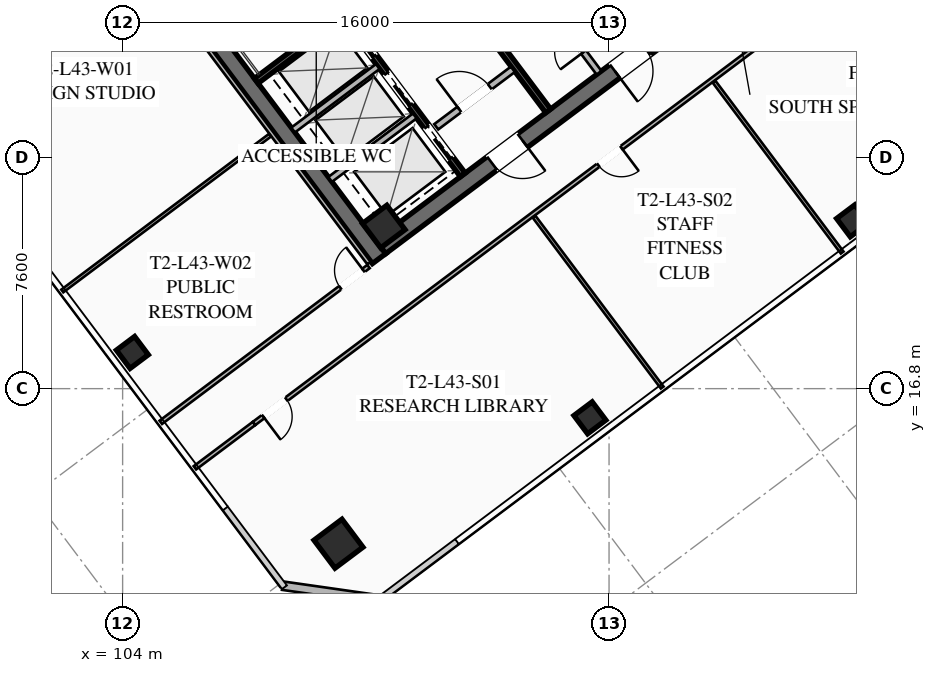
"""IFC4 building model, lengths in metres.
Left out: names, types, materials, properties, quantities, classifications, styles, units other than length and angle.
Written with IfcOpenShell. Run it as: python <this file> out.ifc"""

import sys

from ifc_helpers import new_model, si_unit, direction, frame, frame_2d, origin, origin_2d, place, context, subcontext, project, spatial, rectangle, hollow_rectangle, extrude, element, fill, save


model = new_model("IFC4")
c1 = context("Model", 3, precision=1e-05, world=origin(), true_north=direction((0.0, 1.0)))
c2 = subcontext(c1, "Body", "Model", "MODEL_VIEW")
j1 = project(units=[si_unit("LENGTHUNIT", "METRE"), si_unit("PLANEANGLEUNIT", "RADIAN")], contexts=[c1])
p1 = place(None, origin())
s1 = spatial("IfcSite", under=j1, at=p1, CompositionType="ELEMENT")
p2 = place(p1, origin())
s2 = spatial("IfcBuilding", under=s1, at=p2, CompositionType="ELEMENT")
p3 = place(p2, frame((0.0, 0.0, 160.55)))
s3 = spatial("IfcBuildingStorey", under=s2, at=p3, CompositionType="ELEMENT", Elevation=160.55)
p4 = place(p3, frame((112.436, 21.077, 0.0), z_axis=(0.0, 0.0, 1.0), x_axis=(-0.600005007985, 0.799996243986, 0.0)))
e1 = element("IfcWall", 1, at=p4, inside=s3, PredefinedType="SHEAR", context=c2, shape_type="SweptSolid", body=[
    extrude(rectangle(XDim=15.6, YDim=0.55, at=frame_2d((7.8, 0.0))), origin(), (0.0, 0.0, 1.0), 3.55),
])
p5 = place(p3, frame((124.539, 30.498, 0.0), z_axis=(0.0, 0.0, 1.0), x_axis=(-0.799998054672, -0.600002593761, 0.0)))
e2 = element("IfcWall", 2, at=p5, inside=s3, PredefinedType="SHEAR", context=c2, shape_type="SweptSolid", body=[
    extrude(rectangle(XDim=15.06, YDim=0.55, at=frame_2d((7.53, 0.0))), origin(), (0.0, 0.0, 1.0), 3.55),
])
p6 = place(p5, frame((9.23, 0.0, 0.0)))
e3 = element("IfcOpeningElement", 3, at=p6, cuts=e2, PredefinedType="OPENING", context=c2, shape_type="SweptSolid", body=[
    extrude(rectangle(XDim=1.25, YDim=2.25, at=frame_2d((0.625, 1.125))), frame((0.0, 0.285, 0.0), z_axis=(0.0, -1.0, 0.0), x_axis=(1.0, 0.0, 0.0)), (0.0, 0.0, 1.0), 0.57),
])
p7 = place(p5, frame((4.18, 0.0, 0.0)))
e4 = element("IfcOpeningElement", 4, at=p7, cuts=e2, PredefinedType="OPENING", context=c2, shape_type="SweptSolid", body=[
    extrude(rectangle(XDim=1.25, YDim=2.25, at=frame_2d((0.625, 1.125))), frame((0.0, 0.285, 0.0), z_axis=(0.0, -1.0, 0.0), x_axis=(1.0, 0.0, 0.0)), (0.0, 0.0, 1.0), 0.57),
])
p8 = place(p3, frame((112.59, 22.13, 0.0), z_axis=(0.0, 0.0, 1.0), x_axis=(0.799999996291, 0.600000004945, 0.0)))
e5 = element("IfcColumn", 5, at=p8, inside=s3, PredefinedType="COLUMN", context=c2, shape_type="SweptSolid", body=[
    extrude(hollow_rectangle(XDim=1.0, YDim=1.0, WallThickness=0.04, at=origin_2d()), origin(), (0.0, 0.0, 1.0), 3.37),
])
p9 = place(p3, frame((111.1, 11.7, 0.0), z_axis=(0.0, 0.0, 1.0), x_axis=(0.799999996291, 0.600000004945, 0.0)))
e6 = element("IfcColumn", 6, at=p9, inside=s3, PredefinedType="COLUMN", context=c2, shape_type="SweptSolid", body=[
    extrude(hollow_rectangle(XDim=1.15, YDim=1.15, WallThickness=0.045, at=origin_2d()), origin(), (0.0, 0.0, 1.0), 3.37),
])
for number, where, z_axis, x_axis in (
    (7, (119.37, 15.84, 0.0), (0.0, 0.0, 1.0), (0.8, 0.6, 0.0)),
    (8, (128.01, 22.32, 0.0), (0.0, 0.0, 1.0), (0.8, 0.6, 0.0)),
    (9, (104.32, 17.99, 0.0), (0.0, 0.0, 1.0), (0.8, 0.6, 0.0)),
):
    element("IfcColumn", number, at=place(p3, frame(where, z_axis=z_axis, x_axis=x_axis)), inside=s3, PredefinedType="COLUMN", context=c2, shape_type="SweptSolid", body=[
        extrude(hollow_rectangle(XDim=0.75, YDim=0.75, WallThickness=0.032, at=origin_2d()), origin(), (0.0, 0.0, 1.0), 3.37),
    ])
p10 = place(p3, frame((112.48, 9.86, 0.0), z_axis=(0.0, 0.0, 1.0), x_axis=(-0.989950994782, 0.141410847992, 0.0)))
e10 = element("IfcWall", 10, at=p10, inside=s3, PredefinedType="SOLIDWALL", context=c2, shape_type="SweptSolid", body=[
    extrude(rectangle(XDim=3.253, YDim=0.28, at=frame_2d((1.626, 0.0))), origin(), (0.0, 0.0, 1.0), 3.37),
])
p11 = place(p3, frame((108.396, 26.922, 0.0), z_axis=(0.0, 0.0, 1.0), x_axis=(0.800015298837, 0.599979601008, 0.0)))
e11 = element("IfcWall", 11, at=p11, inside=s3, PredefinedType="SHEAR", context=c2, shape_type="SweptSolid", body=[
    extrude(rectangle(XDim=3.83, YDim=0.2, at=frame_2d((1.915, 0.0))), origin(), (0.0, 0.0, 1.0), 3.37),
])
p12 = place(p3, frame((117.998, 25.936, 0.0), z_axis=(0.0, 0.0, 1.0), x_axis=(-0.600002693989, 0.799997979501, 0.0)))
e12 = element("IfcWall", 12, at=p12, inside=s3, PredefinedType="SHEAR", context=c2, shape_type="SweptSolid", body=[
    extrude(rectangle(XDim=14.5, YDim=0.2, at=frame_2d((7.25, 0.0))), origin(), (0.0, 0.0, 1.0), 3.37),
])
p13 = place(p3, frame((114.316, 25.412, 0.0), z_axis=(0.0, 0.0, 1.0), x_axis=(0.800018601094, 0.59997519774, 0.0)))
e13 = element("IfcWall", 13, at=p13, inside=s3, PredefinedType="SOLIDWALL", context=c2, shape_type="SweptSolid", body=[
    extrude(rectangle(XDim=3.15, YDim=0.22, at=frame_2d((1.575, 0.0))), origin(), (0.0, 0.0, 1.0), 2.723),
])
p14 = place(p13, frame((0.95, 0.0, 0.0)))
e14 = element("IfcOpeningElement", 14, at=p14, cuts=e13, PredefinedType="OPENING", context=c2, shape_type="SweptSolid", body=[
    extrude(rectangle(XDim=1.25, YDim=2.25, at=frame_2d((0.625, 1.125))), frame((0.0, 0.12, 0.0), z_axis=(0.0, -1.0, 0.0), x_axis=(1.0, 0.0, 0.0)), (0.0, 0.0, 1.0), 0.24),
])
p15 = place(p3, frame((115.19, 23.83, 0.0), z_axis=(0.0, 0.0, 1.0), x_axis=(-0.599993943644, 0.800004542231, 0.0)))
e15 = element("IfcWall", 15, at=p15, inside=s3, PredefinedType="SHEAR", context=c2, shape_type="SweptSolid", body=[
    extrude(rectangle(XDim=6.45, YDim=0.2, at=frame_2d((3.225, 0.0))), origin(), (0.0, 0.0, 1.0), 3.37),
])
p16 = place(p15, frame((4.875, 0.0, 0.0)))
e16 = element("IfcOpeningElement", 16, at=p16, cuts=e15, PredefinedType="OPENING", context=c2, shape_type="SweptSolid", body=[
    extrude(rectangle(XDim=1.3, YDim=2.25, at=frame_2d((0.65, 1.125))), frame((0.0, 0.11, 0.0), z_axis=(0.0, -1.0, 0.0), x_axis=(1.0, 0.0, 0.0)), (0.0, 0.0, 1.0), 0.22),
])
p17 = place(p15, frame((2.875, 0.0, 0.0)))
e17 = element("IfcOpeningElement", 17, at=p17, cuts=e15, PredefinedType="OPENING", context=c2, shape_type="SweptSolid", body=[
    extrude(rectangle(XDim=1.3, YDim=2.25, at=frame_2d((0.65, 1.125))), frame((0.0, 0.11, 0.0), z_axis=(0.0, -1.0, 0.0), x_axis=(1.0, 0.0, 0.0)), (0.0, 0.0, 1.0), 0.22),
])
p18 = place(p15, frame((0.675, 0.0, 0.0)))
e18 = element("IfcOpeningElement", 18, at=p18, cuts=e15, PredefinedType="OPENING", context=c2, shape_type="SweptSolid", body=[
    extrude(rectangle(XDim=1.3, YDim=2.25, at=frame_2d((0.65, 1.125))), frame((0.0, 0.11, 0.0), z_axis=(0.0, -1.0, 0.0), x_axis=(1.0, 0.0, 0.0)), (0.0, 0.0, 1.0), 0.22),
])
for number, where, z_axis, x_axis in (
    (19, (110.826, 23.682, 0.0), (0.0, 0.0, 1.0), (0.8, 0.6, 0.0)),
    (20, (109.608, 25.306, 0.0), (0.0, 0.0, 1.0), (0.8, 0.6, 0.0)),
):
    element("IfcWall", number, at=place(p3, frame(where, z_axis=z_axis, x_axis=x_axis)), inside=s3, PredefinedType="SOLIDWALL", context=c2, shape_type="SweptSolid", body=[
        extrude(rectangle(XDim=3.48, YDim=0.2, at=frame_2d((1.74, 0.0))), origin(), (0.0, 0.0, 1.0), 3.37),
    ])
p19 = place(p3, frame((119.67, 27.19, 0.0), z_axis=(0.0, 0.0, 1.0), x_axis=(-0.599988677396, 0.800008491828, 0.0)))
e21 = element("IfcWall", 21, at=p19, inside=s3, PredefinedType="SOLIDWALL", context=c2, shape_type="SweptSolid", body=[
    extrude(rectangle(XDim=6.9, YDim=0.2, at=frame_2d((3.45, 0.0))), origin(), (0.0, 0.0, 1.0), 2.723),
])
p20 = place(p19, frame((0.85, 0.0, 0.0)))
e22 = element("IfcOpeningElement", 22, at=p20, cuts=e21, PredefinedType="OPENING", context=c2, shape_type="SweptSolid", body=[
    extrude(rectangle(XDim=0.95, YDim=2.05, at=frame_2d((0.475, 1.025))), frame((0.0, 0.11, 0.0), z_axis=(0.0, -1.0, 0.0), x_axis=(1.0, 0.0, 0.0)), (0.0, 0.0, 1.0), 0.22),
])
p21 = place(p19, frame((4.8, 0.0, 0.0)))
e23 = element("IfcOpeningElement", 23, at=p21, cuts=e21, PredefinedType="OPENING", context=c2, shape_type="SweptSolid", body=[
    extrude(rectangle(XDim=1.05, YDim=2.2, at=frame_2d((0.525, 1.1))), frame((0.0, 0.11, 0.0), z_axis=(0.0, -1.0, 0.0), x_axis=(1.0, 0.0, 0.0)), (0.0, 0.0, 1.0), 0.22),
])
p22 = place(p3, frame((131.282, 32.874, 0.0), z_axis=(0.0, 0.0, 1.0), x_axis=(-0.8, -0.6, 0.0)))
e24 = element("IfcWall", 24, at=p22, inside=s3, PredefinedType="PARTITIONING", context=c2, shape_type="SweptSolid", body=[
    extrude(rectangle(XDim=28.7, YDim=0.135, at=frame_2d((14.35, 0.0))), origin(), (0.0, 0.0, 1.0), 2.723),
])
p23 = place(p22, frame((27.37, 0.0, 0.0)))
e25 = element("IfcOpeningElement", 25, at=p23, cuts=e24, PredefinedType="OPENING", context=c2, shape_type="SweptSolid", body=[
    extrude(rectangle(XDim=0.95, YDim=2.05, at=frame_2d((0.475, 1.025))), frame((0.0, 0.077, 0.0), z_axis=(0.0, -1.0, 0.0), x_axis=(1.0, 0.0, 0.0)), (0.0, 0.0, 1.0), 0.155),
])
p24 = place(p22, frame((13.592, 0.0, 0.0)))
e26 = element("IfcOpeningElement", 26, at=p24, cuts=e24, PredefinedType="OPENING", context=c2, shape_type="SweptSolid", body=[
    extrude(rectangle(XDim=0.95, YDim=2.05, at=frame_2d((0.475, 1.025))), frame((0.0, 0.077, 0.0), z_axis=(0.0, -1.0, 0.0), x_axis=(1.0, 0.0, 0.0)), (0.0, 0.0, 1.0), 0.155),
])
p25 = place(p22, frame((0.38, 0.0, 0.0)))
e27 = element("IfcOpeningElement", 27, at=p25, cuts=e24, PredefinedType="OPENING", context=c2, shape_type="SweptSolid", body=[
    extrude(rectangle(XDim=0.95, YDim=2.05, at=frame_2d((0.475, 1.025))), frame((0.0, 0.077, 0.0), z_axis=(0.0, -1.0, 0.0), x_axis=(1.0, 0.0, 0.0)), (0.0, 0.0, 1.0), 0.155),
])
p26 = place(p3, frame((106.378, 14.196, 0.0), z_axis=(0.0, 0.0, 1.0), x_axis=(0.800012055778, 0.599983925293, 0.0)))
e28 = element("IfcWall", 28, at=p26, inside=s3, PredefinedType="PARTITIONING", context=c2, shape_type="SweptSolid", body=[
    extrude(rectangle(XDim=2.43, YDim=0.135, at=frame_2d((1.215, 0.0))), origin(), (0.0, 0.0, 1.0), 2.723),
])
for number, where, z_axis, x_axis in (
    (29, (121.748, 16.836, 0.0), (0.0, 0.0, 1.0), (-0.6, 0.8, 0.0)),
    (30, (127.668, 21.276, 0.0), (0.0, 0.0, 1.0), (-0.6, 0.8, 0.0)),
):
    element("IfcWall", number, at=place(p3, frame(where, z_axis=z_axis, x_axis=x_axis)), inside=s3, PredefinedType="PARTITIONING", context=c2, shape_type="SweptSolid", body=[
        extrude(rectangle(XDim=7.03, YDim=0.11, at=frame_2d((3.515, 0.0))), origin(), (0.0, 0.0, 1.0), 2.723),
    ])
p27 = place(p3, frame((112.104, 20.928, 0.0), z_axis=(0.0, 0.0, 1.0), x_axis=(-0.599994940075, 0.800003794918, 0.0)))
e31 = element("IfcWall", 31, at=p27, inside=s3, PredefinedType="PARTITIONING", context=c2, shape_type="SweptSolid", body=[
    extrude(rectangle(XDim=15.44, YDim=0.135, at=frame_2d((7.72, 0.0))), origin(), (0.0, 0.0, 1.0), 2.723),
])
p28 = place(p3, frame((105.256, 15.692, 0.0), z_axis=(0.0, 0.0, 1.0), x_axis=(0.799989708052, 0.600013722352, 0.0)))
e32 = element("IfcWall", 32, at=p28, inside=s3, PredefinedType="PARTITIONING", context=c2, shape_type="SweptSolid", body=[
    extrude(rectangle(XDim=8.54, YDim=0.135, at=frame_2d((4.27, 0.0))), origin(), (0.0, 0.0, 1.0), 2.723),
])
p29 = place(p28, frame((7.38, 0.0, 0.0)))
e33 = element("IfcOpeningElement", 33, at=p29, cuts=e32, PredefinedType="OPENING", context=c2, shape_type="SweptSolid", body=[
    extrude(rectangle(XDim=0.95, YDim=2.05, at=frame_2d((0.475, 1.025))), frame((0.0, 0.077, 0.0), z_axis=(0.0, -1.0, 0.0), x_axis=(1.0, 0.0, 0.0)), (0.0, 0.0, 1.0), 0.155),
])
p30 = place(p3, frame((102.016, 20.012, 0.0), z_axis=(0.0, 0.0, 1.0), x_axis=(0.799989708052, 0.600013722352, 0.0)))
e34 = element("IfcWall", 34, at=p30, inside=s3, PredefinedType="PARTITIONING", context=c2, shape_type="SweptSolid", body=[
    extrude(rectangle(XDim=8.54, YDim=0.11, at=frame_2d((4.27, 0.0))), origin(), (0.0, 0.0, 1.0), 2.723),
])
p31 = place(p6, origin())
e35 = element("IfcDoor", 35, at=p31, inside=s3, OperationType="SINGLE_SWING_LEFT", PredefinedType="DOOR", context=c2, shape_type="SweptSolid", body=[
    extrude(rectangle(XDim=1.25, YDim=2.25, at=frame_2d((0.625, 1.125))), frame((0.0, 0.025, 0.0), z_axis=(0.0, -1.0, 0.0), x_axis=(1.0, 0.0, 0.0)), (0.0, 0.0, 1.0), 0.05),
])
fill(e3, e35)
p32 = place(p7, origin())
e36 = element("IfcDoor", 36, at=p32, inside=s3, OperationType="SINGLE_SWING_RIGHT", PredefinedType="DOOR", context=c2, shape_type="SweptSolid", body=[
    extrude(rectangle(XDim=1.25, YDim=2.25, at=frame_2d((0.625, 1.125))), frame((0.0, 0.025, 0.0), z_axis=(0.0, -1.0, 0.0), x_axis=(1.0, 0.0, 0.0)), (0.0, 0.0, 1.0), 0.05),
])
fill(e4, e36)
p33 = place(p14, origin())
e37 = element("IfcDoor", 37, at=p33, inside=s3, OperationType="SINGLE_SWING_LEFT", PredefinedType="DOOR", context=c2, shape_type="SweptSolid", body=[
    extrude(rectangle(XDim=1.25, YDim=2.25, at=frame_2d((0.625, 1.125))), frame((0.0, 0.025, 0.0), z_axis=(0.0, -1.0, 0.0), x_axis=(1.0, 0.0, 0.0)), (0.0, 0.0, 1.0), 0.05),
])
fill(e14, e37)
p34 = place(p23, origin())
e38 = element("IfcDoor", 38, at=p34, inside=s3, OperationType="SINGLE_SWING_RIGHT", PredefinedType="DOOR", context=c2, shape_type="SweptSolid", body=[
    extrude(rectangle(XDim=0.95, YDim=2.05, at=frame_2d((0.475, 1.025))), frame((0.0, 0.025, 0.0), z_axis=(0.0, -1.0, 0.0), x_axis=(1.0, 0.0, 0.0)), (0.0, 0.0, 1.0), 0.05),
])
fill(e25, e38)
p35 = place(p24, origin())
e39 = element("IfcDoor", 39, at=p35, inside=s3, OperationType="SINGLE_SWING_LEFT", PredefinedType="DOOR", context=c2, shape_type="SweptSolid", body=[
    extrude(rectangle(XDim=0.95, YDim=2.05, at=frame_2d((0.475, 1.025))), frame((0.0, 0.025, 0.0), z_axis=(0.0, -1.0, 0.0), x_axis=(1.0, 0.0, 0.0)), (0.0, 0.0, 1.0), 0.05),
])
fill(e26, e39)
p36 = place(p29, origin())
e40 = element("IfcDoor", 40, at=p36, inside=s3, OperationType="SINGLE_SWING_RIGHT", PredefinedType="DOOR", context=c2, shape_type="SweptSolid", body=[
    extrude(rectangle(XDim=0.95, YDim=2.05, at=frame_2d((0.475, 1.025))), frame((0.0, 0.025, 0.0), z_axis=(0.0, -1.0, 0.0), x_axis=(1.0, 0.0, 0.0)), (0.0, 0.0, 1.0), 0.05),
])
fill(e33, e40)
p37 = place(p16, origin())
e41 = element("IfcDoor", 41, at=p37, inside=s3, OperationType="SLIDING_TO_LEFT", PredefinedType="DOOR", context=c2, shape_type="SweptSolid", body=[
    extrude(rectangle(XDim=1.3, YDim=2.25, at=frame_2d((0.65, 1.125))), frame((0.0, 0.025, 0.0), z_axis=(0.0, -1.0, 0.0), x_axis=(1.0, 0.0, 0.0)), (0.0, 0.0, 1.0), 0.05),
])
fill(e16, e41)
p38 = place(p17, origin())
e42 = element("IfcDoor", 42, at=p38, inside=s3, OperationType="SLIDING_TO_LEFT", PredefinedType="DOOR", context=c2, shape_type="SweptSolid", body=[
    extrude(rectangle(XDim=1.3, YDim=2.25, at=frame_2d((0.65, 1.125))), frame((0.0, 0.025, 0.0), z_axis=(0.0, -1.0, 0.0), x_axis=(1.0, 0.0, 0.0)), (0.0, 0.0, 1.0), 0.05),
])
fill(e17, e42)
p39 = place(p18, origin())
e43 = element("IfcDoor", 43, at=p39, inside=s3, OperationType="SLIDING_TO_LEFT", PredefinedType="DOOR", context=c2, shape_type="SweptSolid", body=[
    extrude(rectangle(XDim=1.3, YDim=2.25, at=frame_2d((0.65, 1.125))), frame((0.0, 0.025, 0.0), z_axis=(0.0, -1.0, 0.0), x_axis=(1.0, 0.0, 0.0)), (0.0, 0.0, 1.0), 0.05),
])
fill(e18, e43)
save(model, sys.argv[1])
